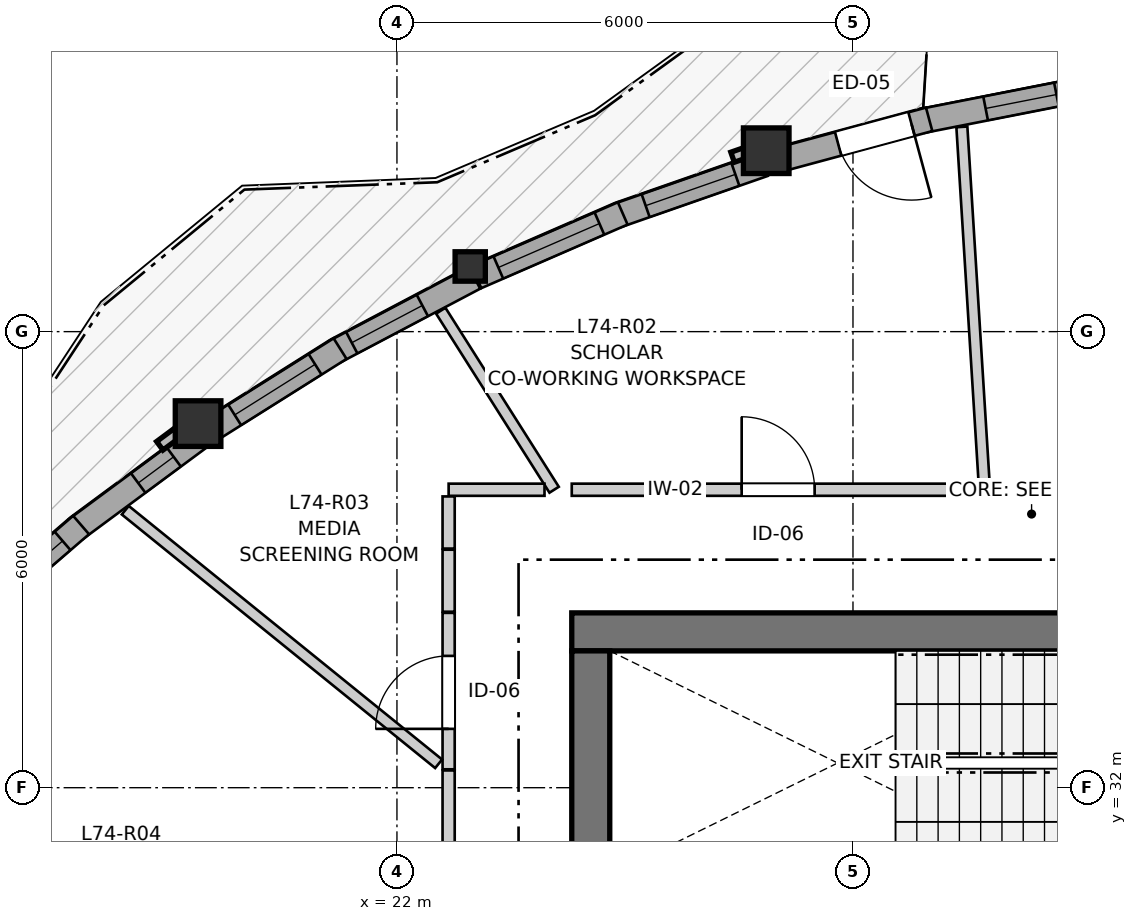
"""IFC4 building model, lengths in metres.
Left out: names, types, materials, properties, quantities, classifications, styles, units other than length and angle.
Written with IfcOpenShell. Run it as: python <this file> out.ifc"""

import sys

from ifc_helpers import new_model, si_unit, direction, frame, frame_2d, origin, origin_2d, place, context, subcontext, project, spatial, rectangle, i_section, extrude, source, transform, mapped, element, fill, save


model = new_model("IFC4")
c1 = context("Model", 3, precision=1e-05, world=origin(), true_north=direction((0.0, 1.0)))
c2 = subcontext(c1, "Body", "Model", "MODEL_VIEW")
j1 = project(units=[si_unit("LENGTHUNIT", "METRE"), si_unit("PLANEANGLEUNIT", "RADIAN")], contexts=[c1])
p1 = place(None, origin())
s1 = spatial("IfcSite", under=j1, at=p1, CompositionType="ELEMENT")
p2 = place(p1, origin())
s2 = spatial("IfcBuilding", under=s1, at=p2, CompositionType="ELEMENT")
p3 = place(p2, frame((0.0, 0.0, 246.8)))
s3 = spatial("IfcBuildingStorey", under=s2, at=p3, CompositionType="ELEMENT", Elevation=246.8)
p4 = place(p3, frame((36.4, 34.05, 0.0), z_axis=(0.0, 0.0, 1.0), x_axis=(-1.0, 0.0, 0.0)))
e1 = element("IfcWall", 1, at=p4, inside=s3, PredefinedType="SHEAR", context=c2, shape_type="SweptSolid", body=[
    extrude(rectangle(XDim=12.1, YDim=0.5, at=frame_2d((6.05, 0.0))), origin(), (0.0, 0.0, 1.0), 2.96),
])
p5 = place(p3, frame((24.55, 33.8, 0.0), z_axis=(0.0, 0.0, 1.0), x_axis=(0.0, -1.0, 0.0)))
e2 = element("IfcWall", 2, at=p5, inside=s3, PredefinedType="SHEAR", context=c2, shape_type="SweptSolid", body=[
    extrude(rectangle(XDim=15.6, YDim=0.5, at=frame_2d((7.8, 0.0))), origin(), (0.0, 0.0, 1.0), 2.96),
])
p6 = place(p5, frame((7.05, 0.0, 0.0)))
e3 = element("IfcOpeningElement", 3, at=p6, cuts=e2, PredefinedType="OPENING", context=c2, shape_type="SweptSolid", body=[
    extrude(rectangle(XDim=1.5, YDim=2.15, at=frame_2d((0.75, 1.075))), frame((0.0, 0.26, 0.0), z_axis=(0.0, -1.0, 0.0), x_axis=(1.0, 0.0, 0.0)), (0.0, 0.0, 1.0), 0.52),
])
p7 = place(p5, frame((3.52, 0.0, 0.0)))
e4 = element("IfcOpeningElement", 4, at=p7, cuts=e2, PredefinedType="OPENING", context=c2, shape_type="SweptSolid", body=[
    extrude(rectangle(XDim=0.86, YDim=2.05, at=frame_2d((0.43, 1.025))), frame((0.0, 0.26, 0.0), z_axis=(0.0, -1.0, 0.0), x_axis=(1.0, 0.0, 0.0)), (0.0, 0.0, 1.0), 0.52),
])
p8 = place(p5, frame((11.22, 0.0, 0.0)))
e5 = element("IfcOpeningElement", 5, at=p8, cuts=e2, PredefinedType="OPENING", context=c2, shape_type="SweptSolid", body=[
    extrude(rectangle(XDim=0.86, YDim=2.05, at=frame_2d((0.43, 1.025))), frame((0.0, 0.26, 0.0), z_axis=(0.0, -1.0, 0.0), x_axis=(1.0, 0.0, 0.0)), (0.0, 0.0, 1.0), 0.52),
])
m1 = source(origin(), c2, "Body", "SweptSolid", [
    extrude(rectangle(XDim=0.6, YDim=0.6, at=origin_2d()), origin(), (0.0, 0.0, 1.0), 2.96),
])
p9 = place(p3, frame((26.859, 40.38, 0.0), z_axis=(0.0, 0.0, 1.0), x_axis=(1.0, 0.0, 0.0)))
e6 = element("IfcColumn", 6, at=p9, inside=s3, PredefinedType="COLUMN", context=c2, shape_type="MappedRepresentation", body=[
    mapped(m1, transform((0.0, 0.0, 0.0), x_axis=(1.0, 0.0, 0.0), y_axis=(0.0, 1.0, 0.0), z_axis=(0.0, 0.0, 1.0), scale=1.0)),
])
m2 = source(origin(), c2, "Body", "SweptSolid", [
    extrude(i_section(OverallWidth=0.398, OverallDepth=0.387, WebThickness=0.019, FlangeThickness=0.03, FilletRadius=0.015, at=origin_2d()), origin(), (0.0, 0.0, 1.0), 2.96),
])
p10 = place(p3, frame((22.964, 38.857, 0.0), z_axis=(0.0, 0.0, 1.0), x_axis=(1.0, 0.0, 0.0)))
e7 = element("IfcColumn", 7, at=p10, inside=s3, PredefinedType="PILASTER", context=c2, shape_type="MappedRepresentation", body=[
    mapped(m2, transform((0.0, 0.0, 0.0), x_axis=(1.0, 0.0, 0.0), y_axis=(0.0, 1.0, 0.0), z_axis=(0.0, 0.0, 1.0), scale=1.0)),
])
p11 = place(p3, frame((19.383, 36.79, 0.0), z_axis=(0.0, 0.0, 1.0), x_axis=(1.0, 0.0, 0.0)))
e8 = element("IfcColumn", 8, at=p11, inside=s3, PredefinedType="COLUMN", context=c2, shape_type="MappedRepresentation", body=[
    mapped(m1, transform((0.0, 0.0, 0.0), x_axis=(1.0, 0.0, 0.0), y_axis=(0.0, 1.0, 0.0), z_axis=(0.0, 0.0, 1.0), scale=1.0)),
])
p12 = place(p3, frame((31.079, 41.198, 0.0), z_axis=(0.0, 0.0, 1.0), x_axis=(-0.981223354781, -0.192874902544, 0.0)))
e9 = element("IfcWall", 9, at=p12, inside=s3, PredefinedType="SOLIDWALL", context=c2, shape_type="SweptSolid", body=[
    extrude(rectangle(XDim=2.202, YDim=0.32, at=frame_2d((1.101, 0.0))), origin(), (0.0, 0.0, 1.0), 2.58),
])
p13 = place(p12, frame((0.409, 0.0, 0.82)))
e10 = element("IfcOpeningElement", 10, at=p13, cuts=e9, PredefinedType="OPENING", context=c2, shape_type="SweptSolid", body=[
    extrude(rectangle(XDim=0.95, YDim=1.35, at=frame_2d((0.475, 0.675))), frame((0.0, 0.17, 0.0), z_axis=(0.0, -1.0, 0.0), x_axis=(1.0, 0.0, 0.0)), (0.0, 0.0, 1.0), 0.34),
])
p14 = place(p3, frame((29.002, 40.793, 0.0), z_axis=(0.0, 0.0, 1.0), x_axis=(-0.965467637734, -0.260523013357, 0.0)))
e11 = element("IfcWall", 11, at=p14, inside=s3, PredefinedType="SOLIDWALL", context=c2, shape_type="SweptSolid", body=[
    extrude(rectangle(XDim=2.087, YDim=0.32, at=frame_2d((1.043, 0.0))), origin(), (0.0, 0.0, 1.0), 2.58),
])
p15 = place(p14, frame((0.24, 0.0, 0.0)))
e12 = element("IfcOpeningElement", 12, at=p15, cuts=e11, PredefinedType="OPENING", context=c2, shape_type="SweptSolid", body=[
    extrude(rectangle(XDim=1.0, YDim=2.1, at=frame_2d((0.5, 1.05))), frame((0.0, 0.17, 0.0), z_axis=(0.0, -1.0, 0.0), x_axis=(1.0, 0.0, 0.0)), (0.0, 0.0, 1.0), 0.34),
])
p16 = place(p3, frame((26.826, 40.199, 0.0), z_axis=(0.0, 0.0, 1.0), x_axis=(-0.944152853185, -0.329507799335, 0.0)))
e13 = element("IfcWall", 13, at=p16, inside=s3, PredefinedType="SOLIDWALL", context=c2, shape_type="SweptSolid", body=[
    extrude(rectangle(XDim=2.052, YDim=0.32, at=frame_2d((1.026, 0.0))), origin(), (0.0, 0.0, 1.0), 2.58),
])
p17 = place(p16, frame((0.396, 0.0, 0.82)))
e14 = element("IfcOpeningElement", 14, at=p17, cuts=e13, PredefinedType="OPENING", context=c2, shape_type="SweptSolid", body=[
    extrude(rectangle(XDim=1.25, YDim=1.35, at=frame_2d((0.625, 0.675))), frame((0.0, 0.17, 0.0), z_axis=(0.0, -1.0, 0.0), x_axis=(1.0, 0.0, 0.0)), (0.0, 0.0, 1.0), 0.34),
])
p18 = place(p3, frame((24.97, 39.555, 0.0), z_axis=(0.0, 0.0, 1.0), x_axis=(-0.917086701486, -0.398687825193, 0.0)))
e15 = element("IfcWall", 15, at=p18, inside=s3, PredefinedType="SOLIDWALL", context=c2, shape_type="SweptSolid", body=[
    extrude(rectangle(XDim=2.099, YDim=0.32, at=frame_2d((1.049, 0.0))), origin(), (0.0, 0.0, 1.0), 2.58),
])
p19 = place(p18, frame((0.334, 0.0, 0.82)))
e16 = element("IfcOpeningElement", 16, at=p19, cuts=e15, PredefinedType="OPENING", context=c2, shape_type="SweptSolid", body=[
    extrude(rectangle(XDim=1.45, YDim=1.25, at=frame_2d((0.725, 0.625))), frame((0.0, 0.17, 0.0), z_axis=(0.0, -1.0, 0.0), x_axis=(1.0, 0.0, 0.0)), (0.0, 0.0, 1.0), 0.34),
])
p20 = place(p3, frame((23.021, 38.707, 0.0), z_axis=(0.0, 0.0, 1.0), x_axis=(-0.884384752847, -0.466758619558, 0.0)))
e17 = element("IfcWall", 17, at=p20, inside=s3, PredefinedType="SOLIDWALL", context=c2, shape_type="SweptSolid", body=[
    extrude(rectangle(XDim=2.087, YDim=0.32, at=frame_2d((1.043, 0.0))), origin(), (0.0, 0.0, 1.0), 2.58),
])
p21 = place(p20, frame((0.777, 0.0, 0.82)))
e18 = element("IfcOpeningElement", 18, at=p21, cuts=e17, PredefinedType="OPENING", context=c2, shape_type="SweptSolid", body=[
    extrude(rectangle(XDim=1.05, YDim=1.45, at=frame_2d((0.525, 0.725))), frame((0.0, 0.17, 0.0), z_axis=(0.0, -1.0, 0.0), x_axis=(1.0, 0.0, 0.0)), (0.0, 0.0, 1.0), 0.34),
])
p22 = place(p3, frame((21.252, 37.777, 0.0), z_axis=(0.0, 0.0, 1.0), x_axis=(-0.846382416581, -0.532575633034, 0.0)))
e19 = element("IfcWall", 19, at=p22, inside=s3, PredefinedType="SOLIDWALL", context=c2, shape_type="SweptSolid", body=[
    extrude(rectangle(XDim=2.017, YDim=0.32, at=frame_2d((1.008, 0.0))), origin(), (0.0, 0.0, 1.0), 2.58),
])
p23 = place(p22, frame((0.388, 0.0, 0.82)))
e20 = element("IfcOpeningElement", 20, at=p23, cuts=e19, PredefinedType="OPENING", context=c2, shape_type="SweptSolid", body=[
    extrude(rectangle(XDim=1.25, YDim=1.35, at=frame_2d((0.625, 0.675))), frame((0.0, 0.17, 0.0), z_axis=(0.0, -1.0, 0.0), x_axis=(1.0, 0.0, 0.0)), (0.0, 0.0, 1.0), 0.34),
])
p24 = place(p3, frame((19.406, 36.608, 0.0), z_axis=(0.0, 0.0, 1.0), x_axis=(-0.803853407146, -0.594827453821, 0.0)))
e21 = element("IfcWall", 21, at=p24, inside=s3, PredefinedType="SOLIDWALL", context=c2, shape_type="SweptSolid", body=[
    extrude(rectangle(XDim=2.029, YDim=0.32, at=frame_2d((1.014, 0.0))), origin(), (0.0, 0.0, 1.0), 2.58),
])
p25 = place(p24, frame((0.428, 0.0, 0.82)))
e22 = element("IfcOpeningElement", 22, at=p25, cuts=e21, PredefinedType="OPENING", context=c2, shape_type="SweptSolid", body=[
    extrude(rectangle(XDim=0.58, YDim=1.35, at=frame_2d((0.29, 0.675))), frame((0.0, 0.17, 0.0), z_axis=(0.0, -1.0, 0.0), x_axis=(1.0, 0.0, 0.0)), (0.0, 0.0, 1.0), 0.34),
])
p26 = place(p3, frame((17.844, 35.456, 0.0), z_axis=(0.0, 0.0, 1.0), x_axis=(-0.757409961601, -0.652939622069, 0.0)))
e23 = element("IfcWall", 23, at=p26, inside=s3, PredefinedType="SOLIDWALL", context=c2, shape_type="SweptSolid", body=[
    extrude(rectangle(XDim=2.122, YDim=0.32, at=frame_2d((1.061, 0.0))), origin(), (0.0, 0.0, 1.0), 2.58),
])
p27 = place(p26, frame((0.321, 0.0, 0.82)))
e24 = element("IfcOpeningElement", 24, at=p27, cuts=e23, PredefinedType="OPENING", context=c2, shape_type="SweptSolid", body=[
    extrude(rectangle(XDim=1.5, YDim=1.45, at=frame_2d((0.75, 0.725))), frame((0.0, 0.17, 0.0), z_axis=(0.0, -1.0, 0.0), x_axis=(1.0, 0.0, 0.0)), (0.0, 0.0, 1.0), 0.34),
])
p28 = place(p3, frame((24.3, 35.92, 0.0), z_axis=(0.0, 0.0, 1.0), x_axis=(1.0, 0.0, 0.0)))
e25 = element("IfcWall", 25, at=p28, inside=s3, PredefinedType="PARTITIONING", context=c2, shape_type="SweptSolid", body=[
    extrude(rectangle(XDim=5.446, YDim=0.16, at=frame_2d((2.723, 0.0))), origin(), (0.0, 0.0, 1.0), 2.96),
])
p29 = place(p28, frame((2.236, 0.0, 0.0)))
e26 = element("IfcOpeningElement", 26, at=p29, cuts=e25, PredefinedType="OPENING", context=c2, shape_type="SweptSolid", body=[
    extrude(rectangle(XDim=0.96, YDim=2.1, at=frame_2d((0.48, 1.05))), frame((0.0, 0.09, 0.0), z_axis=(0.0, -1.0, 0.0), x_axis=(1.0, 0.0, 0.0)), (0.0, 0.0, 1.0), 0.18),
])
p30 = place(p3, frame((22.68, 27.85, 0.0), z_axis=(0.0, 0.0, 1.0), x_axis=(0.0, 1.0, 0.0)))
e27 = element("IfcWall", 27, at=p30, inside=s3, PredefinedType="PARTITIONING", context=c2, shape_type="SweptSolid", body=[
    extrude(rectangle(XDim=4.377, YDim=0.16, at=frame_2d((2.188, 0.0))), origin(), (0.0, 0.0, 1.0), 2.96),
])
p31 = place(p30, frame((1.559, 0.0, 0.0)))
e28 = element("IfcOpeningElement", 28, at=p31, cuts=e27, PredefinedType="OPENING", context=c2, shape_type="SweptSolid", body=[
    extrude(rectangle(XDim=1.3, YDim=2.1, at=frame_2d((0.65, 1.05))), frame((0.0, 0.09, 0.0), z_axis=(0.0, -1.0, 0.0), x_axis=(1.0, 0.0, 0.0)), (0.0, 0.0, 1.0), 0.18),
])
p32 = place(p3, frame((29.761, 35.92, 0.0), z_axis=(0.0, 0.0, 1.0), x_axis=(1.0, 0.0, 0.0)))
e29 = element("IfcWall", 29, at=p32, inside=s3, PredefinedType="PARTITIONING", context=c2, shape_type="SweptSolid", body=[
    extrude(rectangle(XDim=3.61, YDim=0.16, at=frame_2d((1.805, 0.0))), origin(), (0.0, 0.0, 1.0), 2.96),
])
p33 = place(p32, frame((1.133, 0.0, 0.0)))
e30 = element("IfcOpeningElement", 30, at=p33, cuts=e29, PredefinedType="OPENING", context=c2, shape_type="SweptSolid", body=[
    extrude(rectangle(XDim=1.3, YDim=2.1, at=frame_2d((0.65, 1.05))), frame((0.0, 0.09, 0.0), z_axis=(0.0, -1.0, 0.0), x_axis=(1.0, 0.0, 0.0)), (0.0, 0.0, 1.0), 0.18),
])
p34 = place(p3, frame((22.68, 32.242, 0.0), z_axis=(0.0, 0.0, 1.0), x_axis=(0.0, 1.0, 0.0)))
e31 = element("IfcWall", 31, at=p34, inside=s3, PredefinedType="PARTITIONING", context=c2, shape_type="SweptSolid", body=[
    extrude(rectangle(XDim=2.058, YDim=0.16, at=frame_2d((1.029, 0.0))), origin(), (0.0, 0.0, 1.0), 2.628),
])
p35 = place(p34, frame((0.532, 0.0, 0.0)))
e32 = element("IfcOpeningElement", 32, at=p35, cuts=e31, PredefinedType="OPENING", context=c2, shape_type="SweptSolid", body=[
    extrude(rectangle(XDim=0.96, YDim=2.1, at=frame_2d((0.48, 1.05))), frame((0.0, 0.09, 0.0), z_axis=(0.0, -1.0, 0.0), x_axis=(1.0, 0.0, 0.0)), (0.0, 0.0, 1.0), 0.18),
])
p36 = place(p3, frame((18.426, 35.651, 0.0), z_axis=(0.0, 0.0, 1.0), x_axis=(0.777348848989, -0.629069763202, 0.0)))
e33 = element("IfcWall", 33, at=p36, inside=s3, PredefinedType="PARTITIONING", context=c2, shape_type="SweptSolid", body=[
    extrude(rectangle(XDim=5.303, YDim=0.145, at=frame_2d((2.652, 0.0))), origin(), (0.0, 0.0, 1.0), 2.96),
])
p37 = place(p3, frame((29.433, 40.694, 0.0), z_axis=(0.0, 0.0, 1.0), x_axis=(0.062358842424, -0.998053793526, 0.0)))
e34 = element("IfcWall", 34, at=p37, inside=s3, PredefinedType="PARTITIONING", context=c2, shape_type="SweptSolid", body=[
    extrude(rectangle(XDim=4.69, YDim=0.145, at=frame_2d((2.345, 0.0))), origin(), (0.0, 0.0, 1.0), 2.96),
])
p38 = place(p3, frame((22.576, 38.275, 0.0), z_axis=(0.0, 0.0, 1.0), x_axis=(0.535027081988, -0.84483490786, 0.0)))
e35 = element("IfcWall", 35, at=p38, inside=s3, PredefinedType="PARTITIONING", context=c2, shape_type="SweptSolid", body=[
    extrude(rectangle(XDim=2.788, YDim=0.145, at=frame_2d((1.394, 0.0))), origin(), (0.0, 0.0, 1.0), 2.96),
])
p39 = place(p3, frame((22.68, 35.92, 0.0), z_axis=(0.0, 0.0, 1.0), x_axis=(1.0, 0.0, 0.0)))
e36 = element("IfcWall", 36, at=p39, inside=s3, PredefinedType="PARTITIONING", context=c2, shape_type="SweptSolid", body=[
    extrude(rectangle(XDim=1.261, YDim=0.16, at=frame_2d((0.631, 0.0))), origin(), (0.0, 0.0, 1.0), 2.96),
])
p40 = place(p3, frame((22.68, 34.315, 0.0), z_axis=(0.0, 0.0, 1.0), x_axis=(0.0, 1.0, 0.0)))
e37 = element("IfcWall", 37, at=p40, inside=s3, PredefinedType="PARTITIONING", context=c2, shape_type="SweptSolid", body=[
    extrude(rectangle(XDim=0.816, YDim=0.16, at=frame_2d((0.408, 0.0))), origin(), (0.0, 0.0, 1.0), 2.96),
])
p41 = place(p3, frame((22.68, 35.146, 0.0), z_axis=(0.0, 0.0, 1.0), x_axis=(0.0, 1.0, 0.0)))
e38 = element("IfcWall", 38, at=p41, inside=s3, PredefinedType="PARTITIONING", context=c2, shape_type="SweptSolid", body=[
    extrude(rectangle(XDim=0.686, YDim=0.16, at=frame_2d((0.343, 0.0))), origin(), (0.0, 0.0, 1.0), 2.96),
])
m3 = source(origin(), c2, "Body", "SweptSolid", [
    extrude(rectangle(XDim=0.95, YDim=1.35, at=frame_2d((0.475, 0.675))), frame((0.0, 0.03, 0.0), z_axis=(0.0, -1.0, 0.0), x_axis=(1.0, 0.0, 0.0)), (0.0, 0.0, 1.0), 0.06),
])
p42 = place(p13, origin())
e39 = element("IfcWindow", 39, at=p42, inside=s3, PartitioningType="SINGLE_PANEL", PredefinedType="WINDOW", context=c2, shape_type="MappedRepresentation", body=[
    mapped(m3, transform((0.0, 0.0, 0.0), x_axis=(1.0, 0.0, 0.0), y_axis=(0.0, 1.0, 0.0), z_axis=(0.0, 0.0, 1.0), scale=1.0)),
])
fill(e10, e39)
m4 = source(origin(), c2, "Body", "SweptSolid", [
    extrude(rectangle(XDim=1.25, YDim=1.35, at=frame_2d((0.625, 0.675))), frame((0.0, 0.03, 0.0), z_axis=(0.0, -1.0, 0.0), x_axis=(1.0, 0.0, 0.0)), (0.0, 0.0, 1.0), 0.06),
])
p43 = place(p17, origin())
e40 = element("IfcWindow", 40, at=p43, inside=s3, PartitioningType="SINGLE_PANEL", PredefinedType="WINDOW", context=c2, shape_type="MappedRepresentation", body=[
    mapped(m4, transform((0.0, 0.0, 0.0), x_axis=(1.0, 0.0, 0.0), y_axis=(0.0, 1.0, 0.0), z_axis=(0.0, 0.0, 1.0), scale=1.0)),
])
fill(e14, e40)
m5 = source(origin(), c2, "Body", "SweptSolid", [
    extrude(rectangle(XDim=1.45, YDim=1.25, at=frame_2d((0.725, 0.625))), frame((0.0, 0.03, 0.0), z_axis=(0.0, -1.0, 0.0), x_axis=(1.0, 0.0, 0.0)), (0.0, 0.0, 1.0), 0.06),
])
p44 = place(p19, origin())
e41 = element("IfcWindow", 41, at=p44, inside=s3, PartitioningType="SINGLE_PANEL", PredefinedType="WINDOW", context=c2, shape_type="MappedRepresentation", body=[
    mapped(m5, transform((0.0, 0.0, 0.0), x_axis=(1.0, 0.0, 0.0), y_axis=(0.0, 1.0, 0.0), z_axis=(0.0, 0.0, 1.0), scale=1.0)),
])
fill(e16, e41)
m6 = source(origin(), c2, "Body", "SweptSolid", [
    extrude(rectangle(XDim=1.05, YDim=1.45, at=frame_2d((0.525, 0.725))), frame((0.0, 0.03, 0.0), z_axis=(0.0, -1.0, 0.0), x_axis=(1.0, 0.0, 0.0)), (0.0, 0.0, 1.0), 0.06),
])
p45 = place(p21, origin())
e42 = element("IfcWindow", 42, at=p45, inside=s3, PartitioningType="SINGLE_PANEL", PredefinedType="WINDOW", context=c2, shape_type="MappedRepresentation", body=[
    mapped(m6, transform((0.0, 0.0, 0.0), x_axis=(1.0, 0.0, 0.0), y_axis=(0.0, 1.0, 0.0), z_axis=(0.0, 0.0, 1.0), scale=1.0)),
])
fill(e18, e42)
p46 = place(p23, origin())
e43 = element("IfcWindow", 43, at=p46, inside=s3, PartitioningType="SINGLE_PANEL", PredefinedType="WINDOW", context=c2, shape_type="MappedRepresentation", body=[
    mapped(m4, transform((0.0, 0.0, 0.0), x_axis=(1.0, 0.0, 0.0), y_axis=(0.0, 1.0, 0.0), z_axis=(0.0, 0.0, 1.0), scale=1.0)),
])
fill(e20, e43)
m7 = source(origin(), c2, "Body", "SweptSolid", [
    extrude(rectangle(XDim=0.58, YDim=1.35, at=frame_2d((0.29, 0.675))), frame((0.0, 0.03, 0.0), z_axis=(0.0, -1.0, 0.0), x_axis=(1.0, 0.0, 0.0)), (0.0, 0.0, 1.0), 0.06),
])
p47 = place(p25, origin())
e44 = element("IfcWindow", 44, at=p47, inside=s3, PartitioningType="SINGLE_PANEL", PredefinedType="WINDOW", context=c2, shape_type="MappedRepresentation", body=[
    mapped(m7, transform((0.0, 0.0, 0.0), x_axis=(1.0, 0.0, 0.0), y_axis=(0.0, 1.0, 0.0), z_axis=(0.0, 0.0, 1.0), scale=1.0)),
])
fill(e22, e44)
m8 = source(origin(), c2, "Body", "SweptSolid", [
    extrude(rectangle(XDim=1.5, YDim=1.45, at=frame_2d((0.75, 0.725))), frame((0.0, 0.03, 0.0), z_axis=(0.0, -1.0, 0.0), x_axis=(1.0, 0.0, 0.0)), (0.0, 0.0, 1.0), 0.06),
])
p48 = place(p27, origin())
e45 = element("IfcWindow", 45, at=p48, inside=s3, PartitioningType="SINGLE_PANEL", PredefinedType="WINDOW", context=c2, shape_type="MappedRepresentation", body=[
    mapped(m8, transform((0.0, 0.0, 0.0), x_axis=(1.0, 0.0, 0.0), y_axis=(0.0, 1.0, 0.0), z_axis=(0.0, 0.0, 1.0), scale=1.0)),
])
fill(e24, e45)
m9 = source(origin(), c2, "Body", "SweptSolid", [
    extrude(rectangle(XDim=1.0, YDim=2.1, at=frame_2d((0.5, 1.05))), frame((0.0, 0.025, 0.0), z_axis=(0.0, -1.0, 0.0), x_axis=(1.0, 0.0, 0.0)), (0.0, 0.0, 1.0), 0.05),
])
p49 = place(p15, origin())
e46 = element("IfcDoor", 46, at=p49, inside=s3, OperationType="SINGLE_SWING_LEFT", PredefinedType="DOOR", context=c2, shape_type="MappedRepresentation", body=[
    mapped(m9, transform((0.0, 0.0, 0.0), x_axis=(1.0, 0.0, 0.0), y_axis=(0.0, 1.0, 0.0), z_axis=(0.0, 0.0, 1.0), scale=1.0)),
])
fill(e12, e46)
m10 = source(origin(), c2, "Body", "SweptSolid", [
    extrude(rectangle(XDim=0.96, YDim=2.1, at=frame_2d((0.48, 1.05))), frame((0.0, 0.025, 0.0), z_axis=(0.0, -1.0, 0.0), x_axis=(1.0, 0.0, 0.0)), (0.0, 0.0, 1.0), 0.05),
])
p50 = place(p29, origin())
e47 = element("IfcDoor", 47, at=p50, inside=s3, OperationType="SINGLE_SWING_LEFT", PredefinedType="DOOR", context=c2, shape_type="MappedRepresentation", body=[
    mapped(m10, transform((0.0, 0.0, 0.0), x_axis=(1.0, 0.0, 0.0), y_axis=(0.0, 1.0, 0.0), z_axis=(0.0, 0.0, 1.0), scale=1.0)),
])
fill(e26, e47)
p51 = place(p35, origin())
e48 = element("IfcDoor", 48, at=p51, inside=s3, OperationType="SINGLE_SWING_LEFT", PredefinedType="DOOR", context=c2, shape_type="MappedRepresentation", body=[
    mapped(m10, transform((0.0, 0.0, 0.0), x_axis=(1.0, 0.0, 0.0), y_axis=(0.0, 1.0, 0.0), z_axis=(0.0, 0.0, 1.0), scale=1.0)),
])
fill(e32, e48)
save(model, sys.argv[1])
